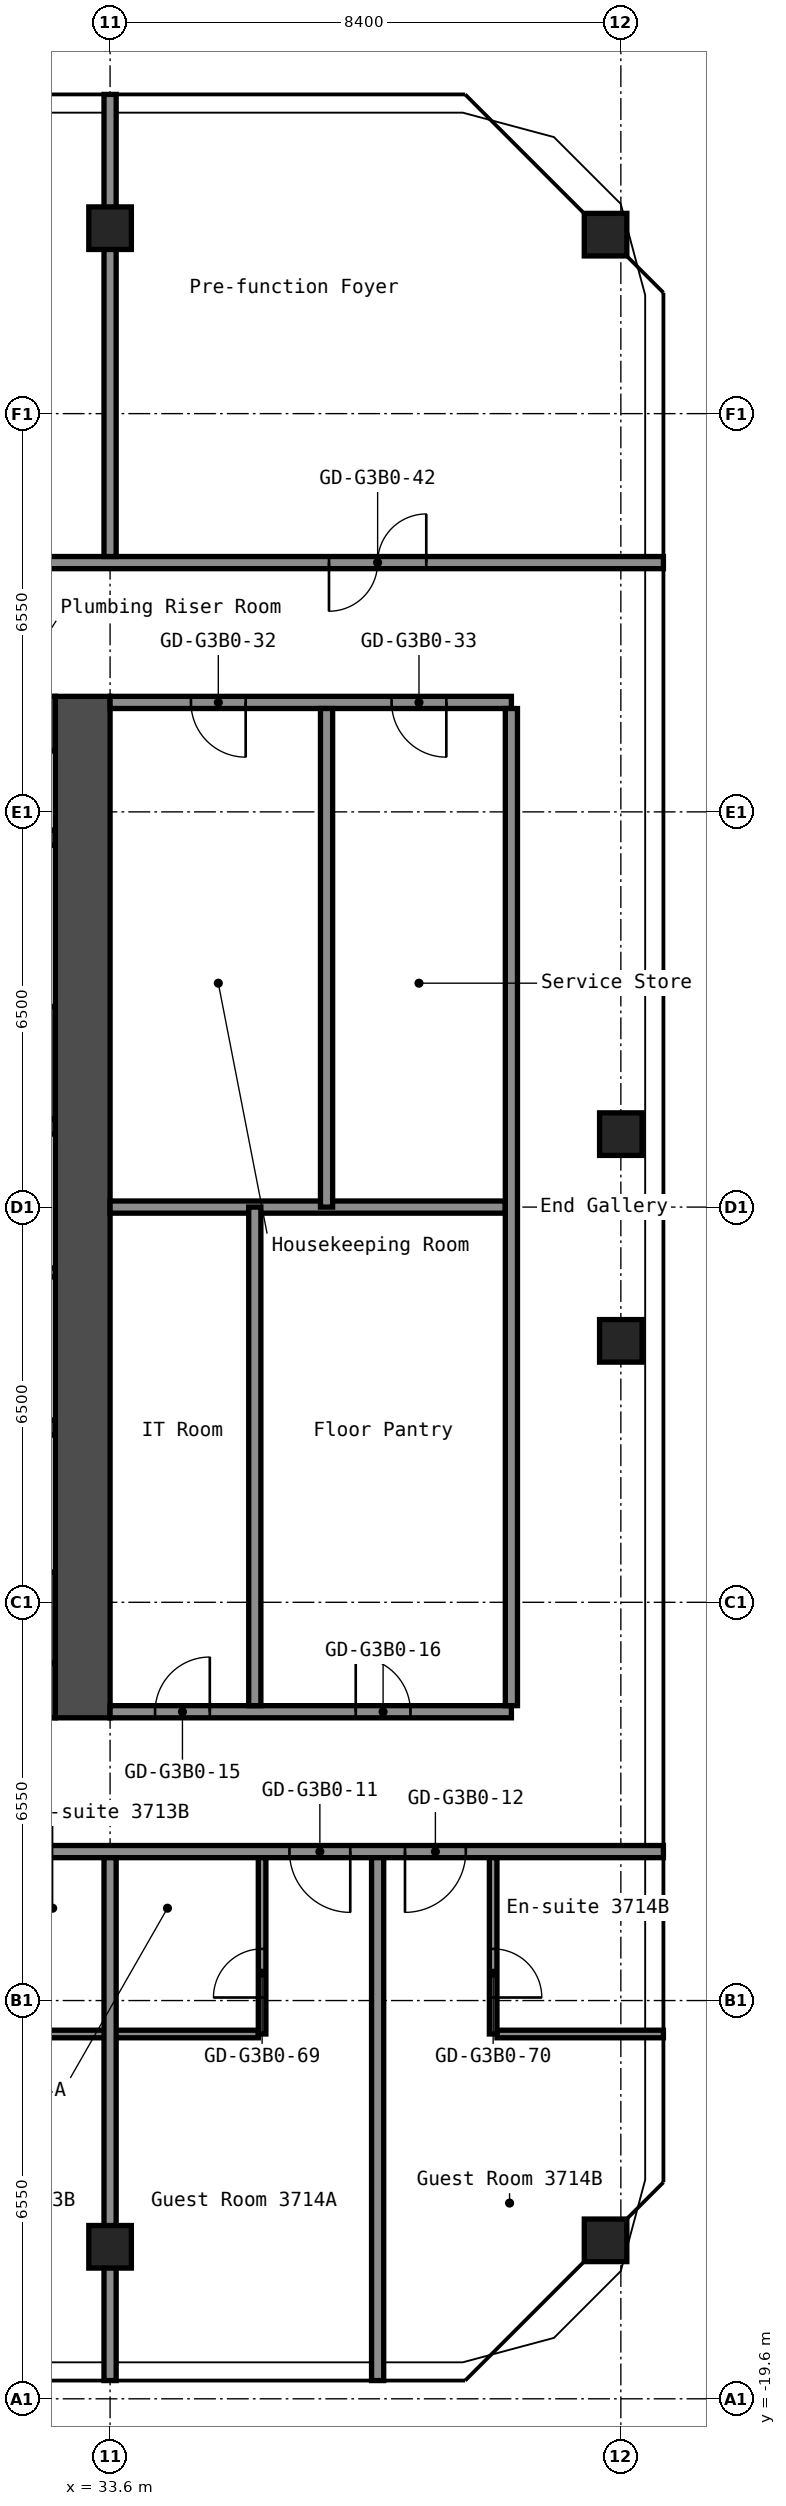
"""IFC4 building model, lengths in metres.
Left out: names, types, materials, properties, quantities, classifications, styles, units other than length and angle.
Written with IfcOpenShell. Run it as: python <this file> out.ifc"""

import sys

from ifc_helpers import new_model, si_unit, direction, frame, frame_2d, origin, origin_2d, place, context, subcontext, project, spatial, rectangle, hollow_rectangle, extrude, element, fill, save


model = new_model("IFC4")
c1 = context("Model", 3, precision=1e-05, world=origin(), true_north=direction((0.0, 1.0)))
c2 = subcontext(c1, "Body", "Model", "MODEL_VIEW")
j1 = project(units=[si_unit("LENGTHUNIT", "METRE"), si_unit("PLANEANGLEUNIT", "RADIAN")], contexts=[c1])
p1 = place(None, origin())
s1 = spatial("IfcSite", under=j1, at=p1, CompositionType="ELEMENT")
p2 = place(p1, origin())
s2 = spatial("IfcBuilding", under=s1, at=p2, CompositionType="ELEMENT")
p3 = place(p2, frame((0.0, 0.0, 134.2)))
s3 = spatial("IfcBuildingStorey", under=s2, at=p3, CompositionType="ELEMENT", Elevation=134.2)
for number, where, z_axis, x_axis in (
    (1, (33.6, -17.1, 0.0), (0.0, 0.0, 1.0), (1.0, 0.0, 0.0)),
    (2, (33.6, 16.1, 0.0), (0.0, 0.0, 1.0), (1.0, 0.0, 0.0)),
    (3, (41.749, -16.994, 0.0), (0.0, 0.0, 1.0), (1.0, 0.0, 0.0)),
    (4, (42.0, -2.2, 0.0), (0.0, 0.0, 1.0), (1.0, 0.0, 0.0)),
    (5, (42.0, 1.2, 0.0), (0.0, 0.0, 1.0), (1.0, 0.0, 0.0)),
    (6, (41.749, 15.994, 0.0), (0.0, 0.0, 1.0), (1.0, 0.0, 0.0)),
):
    element("IfcColumn", number, at=place(p3, frame(where, z_axis=z_axis, x_axis=x_axis)), inside=s3, PredefinedType="COLUMN", context=c2, shape_type="SweptSolid", body=[
        extrude(hollow_rectangle(XDim=0.7, YDim=0.7, WallThickness=0.028, at=origin_2d()), origin(), (0.0, 0.0, 1.0), 2.75),
    ])
p4 = place(p3, frame((33.15, -8.4, 0.0), z_axis=(0.0, 0.0, 1.0), x_axis=(0.0, 1.0, 0.0)))
e7 = element("IfcWall", 7, at=p4, inside=s3, PredefinedType="SHEAR", context=c2, shape_type="SweptSolid", body=[
    extrude(rectangle(XDim=16.8, YDim=0.9, at=frame_2d((8.4, 0.0))), origin(), (0.0, 0.0, 1.0), 2.75),
])
p5 = place(p3, frame((17.7, 7.95, 0.0), z_axis=(0.0, 0.0, 1.0), x_axis=(1.0, 0.0, 0.0)))
e8 = element("IfcWall", 8, at=p5, inside=s3, PredefinedType="SHEAR", context=c2, shape_type="SweptSolid", body=[
    extrude(rectangle(XDim=15.0, YDim=0.9, at=frame_2d((7.5, 0.0))), origin(), (0.0, 0.0, 1.0), 2.75),
])
p6 = place(p5, frame((10.4, 0.0, 0.0)))
e9 = element("IfcOpeningElement", 9, at=p6, cuts=e8, PredefinedType="OPENING", context=c2, shape_type="SweptSolid", body=[
    extrude(rectangle(XDim=1.2, YDim=2.1, at=frame_2d((0.6, 1.05))), frame((0.0, 0.46, 0.0), z_axis=(0.0, -1.0, 0.0), x_axis=(1.0, 0.0, 0.0)), (0.0, 0.0, 1.0), 0.92),
])
p7 = place(p5, frame((13.35, 0.0, 0.0)))
e10 = element("IfcOpeningElement", 10, at=p7, cuts=e8, PredefinedType="OPENING", context=c2, shape_type="SweptSolid", body=[
    extrude(rectangle(XDim=0.9, YDim=2.1, at=frame_2d((0.45, 1.05))), frame((0.0, 0.46, 0.0), z_axis=(0.0, -1.0, 0.0), x_axis=(1.0, 0.0, 0.0)), (0.0, 0.0, 1.0), 0.92),
])
p8 = place(p3, frame((17.7, -7.95, 0.0), z_axis=(0.0, 0.0, 1.0), x_axis=(1.0, 0.0, 0.0)))
e11 = element("IfcWall", 11, at=p8, inside=s3, PredefinedType="SHEAR", context=c2, shape_type="SweptSolid", body=[
    extrude(rectangle(XDim=15.0, YDim=0.9, at=frame_2d((7.5, 0.0))), origin(), (0.0, 0.0, 1.0), 2.75),
])
p9 = place(p8, frame((2.55, 0.0, 0.0)))
e12 = element("IfcOpeningElement", 12, at=p9, cuts=e11, PredefinedType="OPENING", context=c2, shape_type="SweptSolid", body=[
    extrude(rectangle(XDim=1.0, YDim=2.1, at=frame_2d((0.5, 1.05))), frame((0.0, 0.46, 0.0), z_axis=(0.0, -1.0, 0.0), x_axis=(1.0, 0.0, 0.0)), (0.0, 0.0, 1.0), 0.92),
])
p10 = place(p3, frame((27.65, 1.325, 0.0), z_axis=(0.0, 0.0, 1.0), x_axis=(1.0, 0.0, 0.0)))
e13 = element("IfcWall", 13, at=p10, inside=s3, PredefinedType="SHEAR", context=c2, shape_type="SweptSolid", body=[
    extrude(rectangle(XDim=5.05, YDim=0.25, at=frame_2d((2.525, 0.0))), origin(), (0.0, 0.0, 1.0), 2.75),
])
p11 = place(p10, frame((0.55, 0.0, 0.0)))
e14 = element("IfcOpeningElement", 14, at=p11, cuts=e13, PredefinedType="OPENING", context=c2, shape_type="SweptSolid", body=[
    extrude(rectangle(XDim=1.2, YDim=2.1, at=frame_2d((0.6, 1.05))), frame((0.0, 0.135, 0.0), z_axis=(0.0, -1.0, 0.0), x_axis=(1.0, 0.0, 0.0)), (0.0, 0.0, 1.0), 0.27),
])
p12 = place(p3, frame((30.3, 2.375, 0.0), z_axis=(0.0, 0.0, 1.0), x_axis=(1.0, 0.0, 0.0)))
e15 = element("IfcWall", 15, at=p12, inside=s3, PredefinedType="SHEAR", context=c2, shape_type="SweptSolid", body=[
    extrude(rectangle(XDim=2.4, YDim=1.85, at=frame_2d((1.2, 0.0))), origin(), (0.0, 0.0, 1.0), 2.75),
])
p13 = place(p3, frame((30.3, 6.075, 0.0), z_axis=(0.0, 0.0, 1.0), x_axis=(1.0, 0.0, 0.0)))
e16 = element("IfcWall", 16, at=p13, inside=s3, PredefinedType="SHEAR", context=c2, shape_type="SweptSolid", body=[
    extrude(rectangle(XDim=2.4, YDim=0.25, at=frame_2d((1.2, 0.0))), origin(), (0.0, 0.0, 1.0), 2.75),
])
p14 = place(p3, frame((28.15, -3.625, 0.0), z_axis=(0.0, 0.0, 1.0), x_axis=(1.0, 0.0, 0.0)))
e17 = element("IfcWall", 17, at=p14, inside=s3, PredefinedType="SHEAR", context=c2, shape_type="SweptSolid", body=[
    extrude(rectangle(XDim=4.55, YDim=0.25, at=frame_2d((2.275, 0.0))), origin(), (0.0, 0.0, 1.0), 2.75),
])
p15 = place(p3, frame((28.15, -6.75, 0.0), z_axis=(0.0, 0.0, 1.0), x_axis=(1.0, 0.0, 0.0)))
e18 = element("IfcWall", 18, at=p15, inside=s3, PredefinedType="SHEAR", context=c2, shape_type="SweptSolid", body=[
    extrude(rectangle(XDim=4.55, YDim=1.5, at=frame_2d((2.275, 0.0))), origin(), (0.0, 0.0, 1.0), 2.75),
])
p16 = place(p3, frame((29.7, -1.075, 0.0), z_axis=(0.0, 0.0, 1.0), x_axis=(1.0, 0.0, 0.0)))
e19 = element("IfcWall", 19, at=p16, inside=s3, PredefinedType="PARTITIONING", context=c2, shape_type="SweptSolid", body=[
    extrude(rectangle(XDim=3.0, YDim=0.15, at=frame_2d((1.5, 0.0))), origin(), (0.0, 0.0, 1.0), 2.75),
])
p17 = place(p3, frame((31.163, -13.6, 0.0), z_axis=(0.0, 0.0, 1.0), x_axis=(1.0, 0.0, 0.0)))
e20 = element("IfcWall", 20, at=p17, inside=s3, PredefinedType="PARTITIONING", context=c2, shape_type="SweptSolid", body=[
    extrude(rectangle(XDim=4.875, YDim=0.125, at=frame_2d((2.438, 0.0))), origin(), (0.0, 0.0, 1.0), 2.75),
])
p18 = place(p3, frame((39.962, -13.6, 0.0), z_axis=(0.0, 0.0, 1.0), x_axis=(1.0, 0.0, 0.0)))
e21 = element("IfcWall", 21, at=p18, inside=s3, PredefinedType="PARTITIONING", context=c2, shape_type="SweptSolid", body=[
    extrude(rectangle(XDim=2.738, YDim=0.125, at=frame_2d((1.369, 0.0))), origin(), (0.0, 0.0, 1.0), 2.75),
])
p19 = place(p3, frame((16.8, -10.6, 0.0), z_axis=(0.0, 0.0, 1.0), x_axis=(1.0, 0.0, 0.0)))
e22 = element("IfcWall", 22, at=p19, inside=s3, PredefinedType="PARTITIONING", context=c2, shape_type="SweptSolid", body=[
    extrude(rectangle(XDim=25.9, YDim=0.2, at=frame_2d((12.95, 0.0))), origin(), (0.0, 0.0, 1.0), 2.75),
])
p20 = place(p19, frame((2.85, 0.0, 0.0)))
e23 = element("IfcOpeningElement", 23, at=p20, cuts=e22, PredefinedType="OPENING", context=c2, shape_type="SweptSolid", body=[
    extrude(rectangle(XDim=1.0, YDim=2.1, at=frame_2d((0.5, 1.05))), frame((0.0, 0.11, 0.0), z_axis=(0.0, -1.0, 0.0), x_axis=(1.0, 0.0, 0.0)), (0.0, 0.0, 1.0), 0.22),
])
p21 = place(p19, frame((4.55, 0.0, 0.0)))
e24 = element("IfcOpeningElement", 24, at=p21, cuts=e22, PredefinedType="OPENING", context=c2, shape_type="SweptSolid", body=[
    extrude(rectangle(XDim=1.0, YDim=2.1, at=frame_2d((0.5, 1.05))), frame((0.0, 0.11, 0.0), z_axis=(0.0, -1.0, 0.0), x_axis=(1.0, 0.0, 0.0)), (0.0, 0.0, 1.0), 0.22),
])
p22 = place(p19, frame((11.25, 0.0, 0.0)))
e25 = element("IfcOpeningElement", 25, at=p22, cuts=e22, PredefinedType="OPENING", context=c2, shape_type="SweptSolid", body=[
    extrude(rectangle(XDim=1.0, YDim=2.1, at=frame_2d((0.5, 1.05))), frame((0.0, 0.11, 0.0), z_axis=(0.0, -1.0, 0.0), x_axis=(1.0, 0.0, 0.0)), (0.0, 0.0, 1.0), 0.22),
])
p23 = place(p19, frame((12.95, 0.0, 0.0)))
e26 = element("IfcOpeningElement", 26, at=p23, cuts=e22, PredefinedType="OPENING", context=c2, shape_type="SweptSolid", body=[
    extrude(rectangle(XDim=1.0, YDim=2.1, at=frame_2d((0.5, 1.05))), frame((0.0, 0.11, 0.0), z_axis=(0.0, -1.0, 0.0), x_axis=(1.0, 0.0, 0.0)), (0.0, 0.0, 1.0), 0.22),
])
p24 = place(p19, frame((19.75, 0.0, 0.0)))
e27 = element("IfcOpeningElement", 27, at=p24, cuts=e22, PredefinedType="OPENING", context=c2, shape_type="SweptSolid", body=[
    extrude(rectangle(XDim=1.0, YDim=2.1, at=frame_2d((0.5, 1.05))), frame((0.0, 0.11, 0.0), z_axis=(0.0, -1.0, 0.0), x_axis=(1.0, 0.0, 0.0)), (0.0, 0.0, 1.0), 0.22),
])
p25 = place(p19, frame((21.65, 0.0, 0.0)))
e28 = element("IfcOpeningElement", 28, at=p25, cuts=e22, PredefinedType="OPENING", context=c2, shape_type="SweptSolid", body=[
    extrude(rectangle(XDim=1.0, YDim=2.1, at=frame_2d((0.5, 1.05))), frame((0.0, 0.11, 0.0), z_axis=(0.0, -1.0, 0.0), x_axis=(1.0, 0.0, 0.0)), (0.0, 0.0, 1.0), 0.22),
])
p26 = place(p3, frame((33.6, -8.3, 0.0), z_axis=(0.0, 0.0, 1.0), x_axis=(1.0, 0.0, 0.0)))
e29 = element("IfcWall", 29, at=p26, inside=s3, PredefinedType="PARTITIONING", context=c2, shape_type="SweptSolid", body=[
    extrude(rectangle(XDim=6.6, YDim=0.2, at=frame_2d((3.3, 0.0))), origin(), (0.0, 0.0, 1.0), 2.75),
])
p27 = place(p26, frame((0.74, 0.0, 0.0)))
e30 = element("IfcOpeningElement", 30, at=p27, cuts=e29, PredefinedType="OPENING", context=c2, shape_type="SweptSolid", body=[
    extrude(rectangle(XDim=0.9, YDim=2.1, at=frame_2d((0.45, 1.05))), frame((0.0, 0.11, 0.0), z_axis=(0.0, -1.0, 0.0), x_axis=(1.0, 0.0, 0.0)), (0.0, 0.0, 1.0), 0.22),
])
p28 = place(p26, frame((4.04, 0.0, 0.0)))
e31 = element("IfcOpeningElement", 31, at=p28, cuts=e29, PredefinedType="OPENING", context=c2, shape_type="SweptSolid", body=[
    extrude(rectangle(XDim=0.9, YDim=2.1, at=frame_2d((0.45, 1.05))), frame((0.0, 0.11, 0.0), z_axis=(0.0, -1.0, 0.0), x_axis=(1.0, 0.0, 0.0)), (0.0, 0.0, 1.0), 0.22),
])
p29 = place(p3, frame((33.6, 0.0, 0.0), z_axis=(0.0, 0.0, 1.0), x_axis=(1.0, 0.0, 0.0)))
e32 = element("IfcWall", 32, at=p29, inside=s3, PredefinedType="PARTITIONING", context=c2, shape_type="SweptSolid", body=[
    extrude(rectangle(XDim=6.5, YDim=0.2, at=frame_2d((3.25, 0.0))), origin(), (0.0, 0.0, 1.0), 2.75),
])
p30 = place(p3, frame((33.6, 8.3, 0.0), z_axis=(0.0, 0.0, 1.0), x_axis=(1.0, 0.0, 0.0)))
e33 = element("IfcWall", 33, at=p30, inside=s3, PredefinedType="PARTITIONING", context=c2, shape_type="SweptSolid", body=[
    extrude(rectangle(XDim=6.6, YDim=0.2, at=frame_2d((3.3, 0.0))), origin(), (0.0, 0.0, 1.0), 2.75),
])
p31 = place(p30, frame((1.33, 0.0, 0.0)))
e34 = element("IfcOpeningElement", 34, at=p31, cuts=e33, PredefinedType="OPENING", context=c2, shape_type="SweptSolid", body=[
    extrude(rectangle(XDim=0.9, YDim=2.1, at=frame_2d((0.45, 1.05))), frame((0.0, 0.11, 0.0), z_axis=(0.0, -1.0, 0.0), x_axis=(1.0, 0.0, 0.0)), (0.0, 0.0, 1.0), 0.22),
])
p32 = place(p30, frame((4.63, 0.0, 0.0)))
e35 = element("IfcOpeningElement", 35, at=p32, cuts=e33, PredefinedType="OPENING", context=c2, shape_type="SweptSolid", body=[
    extrude(rectangle(XDim=0.9, YDim=2.1, at=frame_2d((0.45, 1.05))), frame((0.0, 0.11, 0.0), z_axis=(0.0, -1.0, 0.0), x_axis=(1.0, 0.0, 0.0)), (0.0, 0.0, 1.0), 0.22),
])
p33 = place(p3, frame((16.8, 10.6, 0.0), z_axis=(0.0, 0.0, 1.0), x_axis=(1.0, 0.0, 0.0)))
e36 = element("IfcWall", 36, at=p33, inside=s3, PredefinedType="PARTITIONING", context=c2, shape_type="SweptSolid", body=[
    extrude(rectangle(XDim=25.9, YDim=0.2, at=frame_2d((12.95, 0.0))), origin(), (0.0, 0.0, 1.0), 2.75),
])
p34 = place(p33, frame((3.4, 0.0, 0.0)))
e37 = element("IfcOpeningElement", 37, at=p34, cuts=e36, PredefinedType="OPENING", context=c2, shape_type="SweptSolid", body=[
    extrude(rectangle(XDim=1.6, YDim=2.1, at=frame_2d((0.8, 1.05))), frame((0.0, 0.11, 0.0), z_axis=(0.0, -1.0, 0.0), x_axis=(1.0, 0.0, 0.0)), (0.0, 0.0, 1.0), 0.22),
])
p35 = place(p33, frame((11.8, 0.0, 0.0)))
e38 = element("IfcOpeningElement", 38, at=p35, cuts=e36, PredefinedType="OPENING", context=c2, shape_type="SweptSolid", body=[
    extrude(rectangle(XDim=1.6, YDim=2.1, at=frame_2d((0.8, 1.05))), frame((0.0, 0.11, 0.0), z_axis=(0.0, -1.0, 0.0), x_axis=(1.0, 0.0, 0.0)), (0.0, 0.0, 1.0), 0.22),
])
p36 = place(p33, frame((20.4, 0.0, 0.0)))
e39 = element("IfcOpeningElement", 39, at=p36, cuts=e36, PredefinedType="OPENING", context=c2, shape_type="SweptSolid", body=[
    extrude(rectangle(XDim=1.6, YDim=2.1, at=frame_2d((0.8, 1.05))), frame((0.0, 0.11, 0.0), z_axis=(0.0, -1.0, 0.0), x_axis=(1.0, 0.0, 0.0)), (0.0, 0.0, 1.0), 0.22),
])
p37 = place(p3, frame((33.6, -19.3, 0.0), z_axis=(0.0, 0.0, 1.0), x_axis=(0.0, 1.0, 0.0)))
e40 = element("IfcWall", 40, at=p37, inside=s3, PredefinedType="PARTITIONING", context=c2, shape_type="SweptSolid", body=[
    extrude(rectangle(XDim=8.6, YDim=0.2, at=frame_2d((4.3, 0.0))), origin(), (0.0, 0.0, 1.0), 2.75),
])
p38 = place(p3, frame((33.6, 10.7, 0.0), z_axis=(0.0, 0.0, 1.0), x_axis=(0.0, 1.0, 0.0)))
e41 = element("IfcWall", 41, at=p38, inside=s3, PredefinedType="PARTITIONING", context=c2, shape_type="SweptSolid", body=[
    extrude(rectangle(XDim=7.6, YDim=0.2, at=frame_2d((3.8, 0.0))), origin(), (0.0, 0.0, 1.0), 2.75),
])
p39 = place(p3, frame((35.98, -8.2, 0.0), z_axis=(0.0, 0.0, 1.0), x_axis=(0.0, 1.0, 0.0)))
e42 = element("IfcWall", 42, at=p39, inside=s3, PredefinedType="PARTITIONING", context=c2, shape_type="SweptSolid", body=[
    extrude(rectangle(XDim=8.2, YDim=0.2, at=frame_2d((4.1, 0.0))), origin(), (0.0, 0.0, 1.0), 2.75),
])
p40 = place(p3, frame((36.1, -13.6, 0.0), z_axis=(0.0, 0.0, 1.0), x_axis=(0.0, 1.0, 0.0)))
e43 = element("IfcWall", 43, at=p40, inside=s3, PredefinedType="PARTITIONING", context=c2, shape_type="SweptSolid", body=[
    extrude(rectangle(XDim=2.9, YDim=0.125, at=frame_2d((1.45, 0.0))), origin(), (0.0, 0.0, 1.0), 2.75),
])
p41 = place(p40, frame((0.6, 0.0, 0.0)))
e44 = element("IfcOpeningElement", 44, at=p41, cuts=e43, PredefinedType="OPENING", context=c2, shape_type="SweptSolid", body=[
    extrude(rectangle(XDim=0.8, YDim=2.1, at=frame_2d((0.4, 1.05))), frame((0.0, 0.073, 0.0), z_axis=(0.0, -1.0, 0.0), x_axis=(1.0, 0.0, 0.0)), (0.0, 0.0, 1.0), 0.145),
])
p42 = place(p3, frame((37.16, 0.0, 0.0), z_axis=(0.0, 0.0, 1.0), x_axis=(0.0, 1.0, 0.0)))
e45 = element("IfcWall", 45, at=p42, inside=s3, PredefinedType="PARTITIONING", context=c2, shape_type="SweptSolid", body=[
    extrude(rectangle(XDim=8.2, YDim=0.2, at=frame_2d((4.1, 0.0))), origin(), (0.0, 0.0, 1.0), 2.75),
])
p43 = place(p3, frame((38.0, -19.3, 0.0), z_axis=(0.0, 0.0, 1.0), x_axis=(0.0, 1.0, 0.0)))
e46 = element("IfcWall", 46, at=p43, inside=s3, PredefinedType="PARTITIONING", context=c2, shape_type="SweptSolid", body=[
    extrude(rectangle(XDim=8.6, YDim=0.2, at=frame_2d((4.3, 0.0))), origin(), (0.0, 0.0, 1.0), 2.75),
])
p44 = place(p3, frame((39.9, -13.6, 0.0), z_axis=(0.0, 0.0, 1.0), x_axis=(0.0, 1.0, 0.0)))
e47 = element("IfcWall", 47, at=p44, inside=s3, PredefinedType="PARTITIONING", context=c2, shape_type="SweptSolid", body=[
    extrude(rectangle(XDim=2.9, YDim=0.125, at=frame_2d((1.45, 0.0))), origin(), (0.0, 0.0, 1.0), 2.75),
])
p45 = place(p44, frame((0.6, 0.0, 0.0)))
e48 = element("IfcOpeningElement", 48, at=p45, cuts=e47, PredefinedType="OPENING", context=c2, shape_type="SweptSolid", body=[
    extrude(rectangle(XDim=0.8, YDim=2.1, at=frame_2d((0.4, 1.05))), frame((0.0, 0.073, 0.0), z_axis=(0.0, -1.0, 0.0), x_axis=(1.0, 0.0, 0.0)), (0.0, 0.0, 1.0), 0.145),
])
p46 = place(p3, frame((40.2, -8.2, 0.0), z_axis=(0.0, 0.0, 1.0), x_axis=(0.0, 1.0, 0.0)))
e49 = element("IfcWall", 49, at=p46, inside=s3, PredefinedType="PARTITIONING", context=c2, shape_type="SweptSolid", body=[
    extrude(rectangle(XDim=16.4, YDim=0.2, at=frame_2d((8.2, 0.0))), origin(), (0.0, 0.0, 1.0), 2.75),
])
p47 = place(p24, origin())
e50 = element("IfcDoor", 50, at=p47, inside=s3, OperationType="SINGLE_SWING_RIGHT", PredefinedType="DOOR", context=c2, shape_type="SweptSolid", body=[
    extrude(rectangle(XDim=1.0, YDim=2.1, at=frame_2d((0.5, 1.05))), frame((0.0, 0.025, 0.0), z_axis=(0.0, -1.0, 0.0), x_axis=(1.0, 0.0, 0.0)), (0.0, 0.0, 1.0), 0.05),
])
fill(e27, e50)
p48 = place(p25, origin())
e51 = element("IfcDoor", 51, at=p48, inside=s3, OperationType="SINGLE_SWING_LEFT", PredefinedType="DOOR", context=c2, shape_type="SweptSolid", body=[
    extrude(rectangle(XDim=1.0, YDim=2.1, at=frame_2d((0.5, 1.05))), frame((0.0, 0.025, 0.0), z_axis=(0.0, -1.0, 0.0), x_axis=(1.0, 0.0, 0.0)), (0.0, 0.0, 1.0), 0.05),
])
fill(e28, e51)
p49 = place(p27, origin())
e52 = element("IfcDoor", 52, at=p49, inside=s3, OperationType="SINGLE_SWING_LEFT", PredefinedType="DOOR", context=c2, shape_type="SweptSolid", body=[
    extrude(rectangle(XDim=0.9, YDim=2.1, at=frame_2d((0.45, 1.05))), frame((0.0, 0.025, 0.0), z_axis=(0.0, -1.0, 0.0), x_axis=(1.0, 0.0, 0.0)), (0.0, 0.0, 1.0), 0.05),
])
fill(e30, e52)
p50 = place(p28, origin())
e53 = element("IfcDoor", 53, at=p50, inside=s3, OperationType="SINGLE_SWING_RIGHT", PredefinedType="DOOR", context=c2, shape_type="SweptSolid", body=[
    extrude(rectangle(XDim=0.9, YDim=2.1, at=frame_2d((0.45, 1.05))), frame((0.0, 0.025, 0.0), z_axis=(0.0, -1.0, 0.0), x_axis=(1.0, 0.0, 0.0)), (0.0, 0.0, 1.0), 0.05),
])
fill(e31, e53)
p51 = place(p31, origin())
e54 = element("IfcDoor", 54, at=p51, inside=s3, OperationType="SINGLE_SWING_RIGHT", PredefinedType="DOOR", context=c2, shape_type="SweptSolid", body=[
    extrude(rectangle(XDim=0.9, YDim=2.1, at=frame_2d((0.45, 1.05))), frame((0.0, 0.025, 0.0), z_axis=(0.0, -1.0, 0.0), x_axis=(1.0, 0.0, 0.0)), (0.0, 0.0, 1.0), 0.05),
])
fill(e34, e54)
p52 = place(p32, origin())
e55 = element("IfcDoor", 55, at=p52, inside=s3, OperationType="SINGLE_SWING_RIGHT", PredefinedType="DOOR", context=c2, shape_type="SweptSolid", body=[
    extrude(rectangle(XDim=0.9, YDim=2.1, at=frame_2d((0.45, 1.05))), frame((0.0, 0.025, 0.0), z_axis=(0.0, -1.0, 0.0), x_axis=(1.0, 0.0, 0.0)), (0.0, 0.0, 1.0), 0.05),
])
fill(e35, e55)
p53 = place(p36, origin())
e56 = element("IfcDoor", 56, at=p53, inside=s3, OperationType="DOUBLE_DOOR_SINGLE_SWING", PredefinedType="DOOR", context=c2, shape_type="SweptSolid", body=[
    extrude(rectangle(XDim=1.6, YDim=2.1, at=frame_2d((0.8, 1.05))), frame((0.0, 0.025, 0.0), z_axis=(0.0, -1.0, 0.0), x_axis=(1.0, 0.0, 0.0)), (0.0, 0.0, 1.0), 0.05),
])
fill(e39, e56)
p54 = place(p41, origin())
e57 = element("IfcDoor", 57, at=p54, inside=s3, OperationType="SINGLE_SWING_RIGHT", PredefinedType="DOOR", context=c2, shape_type="SweptSolid", body=[
    extrude(rectangle(XDim=0.8, YDim=2.1, at=frame_2d((0.4, 1.05))), frame((0.0, 0.025, 0.0), z_axis=(0.0, -1.0, 0.0), x_axis=(1.0, 0.0, 0.0)), (0.0, 0.0, 1.0), 0.05),
])
fill(e44, e57)
p55 = place(p45, origin())
e58 = element("IfcDoor", 58, at=p55, inside=s3, OperationType="SINGLE_SWING_LEFT", PredefinedType="DOOR", context=c2, shape_type="SweptSolid", body=[
    extrude(rectangle(XDim=0.8, YDim=2.1, at=frame_2d((0.4, 1.05))), frame((0.0, 0.025, 0.0), z_axis=(0.0, -1.0, 0.0), x_axis=(1.0, 0.0, 0.0)), (0.0, 0.0, 1.0), 0.05),
])
fill(e48, e58)
save(model, sys.argv[1])
